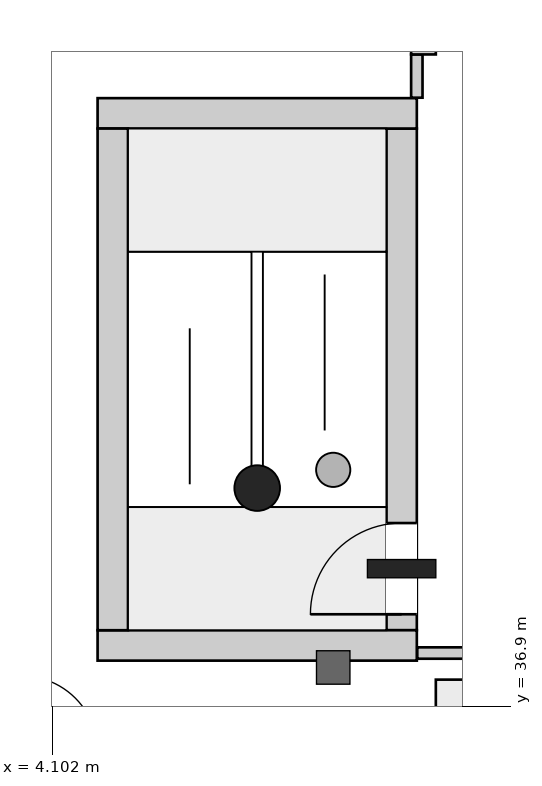
"""IFC4 building model, lengths in metres.
Left out: names, types, materials, properties, quantities, classifications, styles, units other than length and angle.
Written with IfcOpenShell. Run it as: python <this file> out.ifc"""

import sys

from ifc_helpers import new_model, si_unit, direction, frame, frame_2d, origin, origin_2d, place, context, subcontext, project, spatial, rectangle, extrude, element, fill, save


model = new_model("IFC4")
c1 = context("Model", 3, precision=1e-05, world=origin(), true_north=direction((0.0, 1.0)))
c2 = subcontext(c1, "Body", "Model", "MODEL_VIEW")
j1 = project(units=[si_unit("LENGTHUNIT", "METRE"), si_unit("PLANEANGLEUNIT", "RADIAN")], contexts=[c1])
p1 = place(None, origin())
s1 = spatial("IfcSite", under=j1, at=p1, CompositionType="ELEMENT")
p2 = place(p1, origin())
s2 = spatial("IfcBuilding", under=s1, at=p2, CompositionType="ELEMENT")
p3 = place(p2, frame((0.0, 0.0, 31.9)))
s3 = spatial("IfcBuildingStorey", under=s2, at=p3, CompositionType="ELEMENT", Elevation=31.9)
for number, where, z_axis, x_axis in (
    (1, (4.7, 37.7, 0.0), (0.0, 0.0, 1.0), (1.0, 0.0, 0.0)),
    (2, (4.7, 44.7, 0.0), (0.0, 0.0, 1.0), (1.0, 0.0, 0.0)),
):
    element("IfcWall", number, at=place(p3, frame(where, z_axis=z_axis, x_axis=x_axis)), inside=s3, PredefinedType="SHEAR", context=c2, shape_type="SweptSolid", body=[
        extrude(rectangle(XDim=4.2, YDim=0.4, at=frame_2d((2.1, 0.0))), origin(), (0.0, 0.0, 1.0), 4.2),
    ])
p4 = place(p3, frame((4.9, 37.9, 0.0), z_axis=(0.0, 0.0, 1.0), x_axis=(0.0, 1.0, 0.0)))
e3 = element("IfcWall", 3, at=p4, inside=s3, PredefinedType="SHEAR", context=c2, shape_type="SweptSolid", body=[
    extrude(rectangle(XDim=6.6, YDim=0.4, at=frame_2d((3.3, 0.0))), origin(), (0.0, 0.0, 1.0), 4.2),
])
p5 = place(p3, frame((8.7, 37.9, 0.0), z_axis=(0.0, 0.0, 1.0), x_axis=(0.0, 1.0, 0.0)))
e4 = element("IfcWall", 4, at=p5, inside=s3, PredefinedType="SHEAR", context=c2, shape_type="SweptSolid", body=[
    extrude(rectangle(XDim=6.6, YDim=0.4, at=frame_2d((3.3, 0.0))), origin(), (0.0, 0.0, 1.0), 4.2),
])
p6 = place(p5, frame((0.21, 0.0, 0.0)))
e5 = element("IfcOpeningElement", 5, at=p6, cuts=e4, PredefinedType="OPENING", context=c2, shape_type="SweptSolid", body=[
    extrude(rectangle(XDim=1.2, YDim=2.1, at=frame_2d((0.6, 1.05))), frame((0.0, 0.21, 0.0), z_axis=(0.0, -1.0, 0.0), x_axis=(1.0, 0.0, 0.0)), (0.0, 0.0, 1.0), 0.42),
])
p7 = place(p3, frame((9.6, 36.8, 0.0), z_axis=(0.0, 0.0, 1.0), x_axis=(1.0, 0.0, 0.0)))
e6 = element("IfcColumn", 6, at=p7, inside=s3, PredefinedType="COLUMN", context=c2, shape_type="SweptSolid", body=[
    extrude(rectangle(XDim=0.9, YDim=0.9, at=origin_2d()), origin(), (0.0, 0.0, 1.0), 4.2),
])
p8 = place(p3, frame((8.9, 44.906, 0.0), z_axis=(0.0, 0.0, 1.0), x_axis=(0.0, 1.0, 0.0)))
e7 = element("IfcWall", 7, at=p8, inside=s3, PredefinedType="PARTITIONING", context=c2, shape_type="SweptSolid", body=[
    extrude(rectangle(XDim=0.569, YDim=0.15, at=frame_2d((0.285, 0.0))), origin(), (0.0, 0.0, 1.0), 3.9),
])
p9 = place(p3, frame((8.825, 45.55, 0.0), z_axis=(0.0, 0.0, 1.0), x_axis=(1.0, 0.0, 0.0)))
e8 = element("IfcWall", 8, at=p9, inside=s3, PredefinedType="PARTITIONING", context=c2, shape_type="SweptSolid", body=[
    extrude(rectangle(XDim=0.325, YDim=0.15, at=frame_2d((0.163, 0.0))), origin(), (0.0, 0.0, 1.0), 3.9),
])
p10 = place(p3, frame((8.906, 37.6, 0.0), z_axis=(0.0, 0.0, 1.0), x_axis=(1.0, 0.0, 0.0)))
e9 = element("IfcWall", 9, at=p10, inside=s3, PredefinedType="PARTITIONING", context=c2, shape_type="SweptSolid", body=[
    extrude(rectangle(XDim=1.219, YDim=0.15, at=frame_2d((0.609, 0.0))), origin(), (0.0, 0.0, 1.0), 3.9),
])
p11 = place(p6, origin())
e10 = element("IfcDoor", 10, at=p11, inside=s3, OperationType="SINGLE_SWING_RIGHT", PredefinedType="DOOR", context=c2, shape_type="SweptSolid", body=[
    extrude(rectangle(XDim=1.2, YDim=2.1, at=frame_2d((0.6, 1.05))), frame((0.0, 0.025, 0.0), z_axis=(0.0, -1.0, 0.0), x_axis=(1.0, 0.0, 0.0)), (0.0, 0.0, 1.0), 0.05),
])
fill(e5, e10)
save(model, sys.argv[1])
